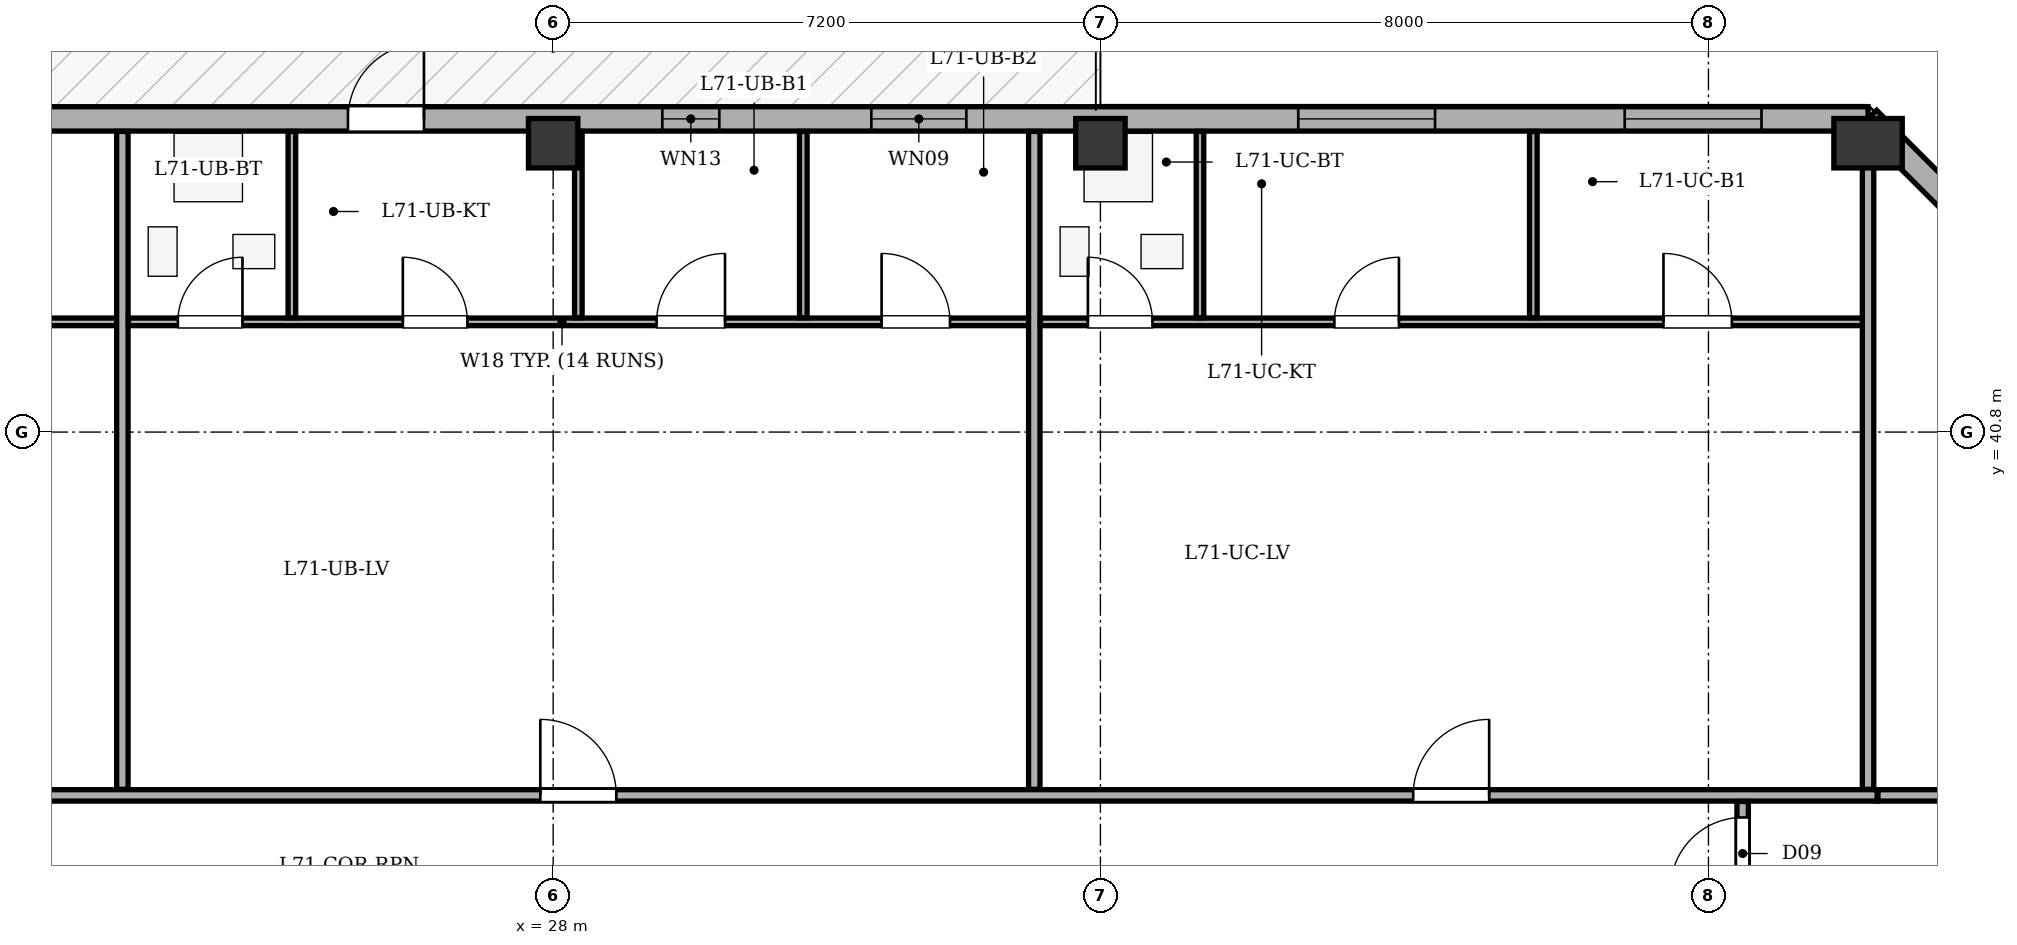
"""IFC4 building model, lengths in metres.
Left out: names, types, materials, properties, quantities, classifications, styles, units other than length and angle.
Written with IfcOpenShell. Run it as: python <this file> out.ifc"""

import sys

from ifc_helpers import new_model, si_unit, direction, frame, frame_2d, origin, origin_2d, place, context, subcontext, project, spatial, rectangle, extrude, element, fill, save


model = new_model("IFC4")
c1 = context("Model", 3, precision=1e-05, world=origin(), true_north=direction((0.0, 1.0)))
c2 = subcontext(c1, "Body", "Model", "MODEL_VIEW")
j1 = project(units=[si_unit("LENGTHUNIT", "METRE"), si_unit("PLANEANGLEUNIT", "RADIAN")], contexts=[c1])
p1 = place(None, origin())
s1 = spatial("IfcSite", under=j1, at=p1, CompositionType="ELEMENT")
p2 = place(p1, origin())
s2 = spatial("IfcBuilding", under=s1, at=p2, CompositionType="ELEMENT")
p3 = place(p2, frame((0.0, 0.0, 268.7)))
s3 = spatial("IfcBuildingStorey", under=s2, at=p3, CompositionType="ELEMENT", Elevation=268.7)
for number, where, z_axis, x_axis in (
    (1, (28.0, 44.6, 0.0), (0.0, 0.0, 1.0), (1.0, 0.0, 0.0)),
    (2, (35.2, 44.6, 0.0), (0.0, 0.0, 1.0), (1.0, 0.0, 0.0)),
):
    element("IfcColumn", number, at=place(p3, frame(where, z_axis=z_axis, x_axis=x_axis)), inside=s3, PredefinedType="COLUMN", context=c2, shape_type="SweptSolid", body=[
        extrude(rectangle(XDim=0.65, YDim=0.65, at=origin_2d()), origin(), (0.0, 0.0, 1.0), 3.4),
    ])
p4 = place(p3, frame((45.3, 44.6, 0.0), z_axis=(0.0, 0.0, 1.0), x_axis=(1.0, 0.0, 0.0)))
e3 = element("IfcColumn", 3, at=p4, inside=s3, PredefinedType="COLUMN", context=c2, shape_type="SweptSolid", body=[
    extrude(rectangle(XDim=0.65, YDim=0.9, at=origin_2d()), origin(), (0.0, 0.0, 1.0), 3.4),
])
p5 = place(p3, frame((8.3, 44.92, 0.0), z_axis=(0.0, 0.0, 1.0), x_axis=(1.0, 0.0, 0.0)))
e4 = element("IfcWall", 4, at=p5, inside=s3, PredefinedType="STANDARD", context=c2, shape_type="SweptSolid", body=[
    extrude(rectangle(XDim=37.0, YDim=0.32, at=frame_2d((18.5, 0.0))), origin(), (0.0, 0.0, 1.0), 2.725),
])
p6 = place(p5, frame((17.0, 0.0, 0.0)))
e5 = element("IfcOpeningElement", 5, at=p6, cuts=e4, PredefinedType="OPENING", context=c2, shape_type="SweptSolid", body=[
    extrude(rectangle(XDim=1.0, YDim=2.02, at=frame_2d((0.5, 1.01))), frame((0.0, 0.17, 0.0), z_axis=(0.0, -1.0, 0.0), x_axis=(1.0, 0.0, 0.0)), (0.0, 0.0, 1.0), 0.34),
])
p7 = place(p5, frame((6.295, 0.0, 0.75)))
e6 = element("IfcOpeningElement", 6, at=p7, cuts=e4, PredefinedType="OPENING", context=c2, shape_type="SweptSolid", body=[
    extrude(rectangle(XDim=1.8, YDim=1.7, at=frame_2d((0.9, 0.85))), frame((0.0, 0.17, 0.0), z_axis=(0.0, -1.0, 0.0), x_axis=(1.0, 0.0, 0.0)), (0.0, 0.0, 1.0), 0.34),
])
p8 = place(p5, frame((23.886, 0.0, 0.75)))
e7 = element("IfcOpeningElement", 7, at=p8, cuts=e4, PredefinedType="OPENING", context=c2, shape_type="SweptSolid", body=[
    extrude(rectangle(XDim=1.25, YDim=1.7, at=frame_2d((0.625, 0.85))), frame((0.0, 0.17, 0.0), z_axis=(0.0, -1.0, 0.0), x_axis=(1.0, 0.0, 0.0)), (0.0, 0.0, 1.0), 0.34),
])
p9 = place(p5, frame((29.503, 0.0, 0.75)))
e8 = element("IfcOpeningElement", 8, at=p9, cuts=e4, PredefinedType="OPENING", context=c2, shape_type="SweptSolid", body=[
    extrude(rectangle(XDim=1.8, YDim=1.7, at=frame_2d((0.9, 0.85))), frame((0.0, 0.17, 0.0), z_axis=(0.0, -1.0, 0.0), x_axis=(1.0, 0.0, 0.0)), (0.0, 0.0, 1.0), 0.34),
])
p10 = place(p5, frame((33.798, 0.0, 0.75)))
e9 = element("IfcOpeningElement", 9, at=p10, cuts=e4, PredefinedType="OPENING", context=c2, shape_type="SweptSolid", body=[
    extrude(rectangle(XDim=1.8, YDim=1.7, at=frame_2d((0.9, 0.85))), frame((0.0, 0.17, 0.0), z_axis=(0.0, -1.0, 0.0), x_axis=(1.0, 0.0, 0.0)), (0.0, 0.0, 1.0), 0.34),
])
p11 = place(p5, frame((10.558, 0.0, 0.75)))
e10 = element("IfcOpeningElement", 10, at=p11, cuts=e4, PredefinedType="OPENING", context=c2, shape_type="SweptSolid", body=[
    extrude(rectangle(XDim=0.75, YDim=1.45, at=frame_2d((0.375, 0.725))), frame((0.0, 0.17, 0.0), z_axis=(0.0, -1.0, 0.0), x_axis=(1.0, 0.0, 0.0)), (0.0, 0.0, 1.0), 0.34),
])
p12 = place(p5, frame((21.136, 0.0, 0.75)))
e11 = element("IfcOpeningElement", 11, at=p12, cuts=e4, PredefinedType="OPENING", context=c2, shape_type="SweptSolid", body=[
    extrude(rectangle(XDim=0.75, YDim=1.45, at=frame_2d((0.375, 0.725))), frame((0.0, 0.17, 0.0), z_axis=(0.0, -1.0, 0.0), x_axis=(1.0, 0.0, 0.0)), (0.0, 0.0, 1.0), 0.34),
])
p13 = place(p3, frame((45.3, 44.92, 0.0), z_axis=(0.0, 0.0, 1.0), x_axis=(0.70712937715, -0.707084184501, 0.0)))
e12 = element("IfcWall", 12, at=p13, inside=s3, PredefinedType="STANDARD", context=c2, shape_type="SweptSolid", body=[
    extrude(rectangle(XDim=5.402, YDim=0.32, at=frame_2d((2.701, 0.0))), origin(), (0.0, 0.0, 1.0), 2.725),
])
p14 = place(p13, frame((2.001, 0.0, 0.75)))
e13 = element("IfcOpeningElement", 13, at=p14, cuts=e12, PredefinedType="OPENING", context=c2, shape_type="SweptSolid", body=[
    extrude(rectangle(XDim=1.4, YDim=1.65, at=frame_2d((0.7, 0.825))), frame((0.0, 0.17, 0.0), z_axis=(0.0, -1.0, 0.0), x_axis=(1.0, 0.0, 0.0)), (0.0, 0.0, 1.0), 0.34),
])
p15 = place(p3, frame((10.9, 36.02, 0.0), z_axis=(0.0, 0.0, 1.0), x_axis=(1.0, 0.0, 0.0)))
e14 = element("IfcWall", 14, at=p15, inside=s3, PredefinedType="PARTITIONING", context=c2, shape_type="SweptSolid", body=[
    extrude(rectangle(XDim=34.52, YDim=0.15, at=frame_2d((17.26, 0.0))), origin(), (0.0, 0.0, 1.0), 3.1),
])
p16 = place(p15, frame((5.276, 0.0, 0.0)))
e15 = element("IfcOpeningElement", 15, at=p16, cuts=e14, PredefinedType="OPENING", context=c2, shape_type="SweptSolid", body=[
    extrude(rectangle(XDim=1.0, YDim=2.1, at=frame_2d((0.5, 1.05))), frame((0.0, 0.085, 0.0), z_axis=(0.0, -1.0, 0.0), x_axis=(1.0, 0.0, 0.0)), (0.0, 0.0, 1.0), 0.17),
])
p17 = place(p15, frame((16.931, 0.0, 0.0)))
e16 = element("IfcOpeningElement", 16, at=p17, cuts=e14, PredefinedType="OPENING", context=c2, shape_type="SweptSolid", body=[
    extrude(rectangle(XDim=1.0, YDim=2.1, at=frame_2d((0.5, 1.05))), frame((0.0, 0.085, 0.0), z_axis=(0.0, -1.0, 0.0), x_axis=(1.0, 0.0, 0.0)), (0.0, 0.0, 1.0), 0.17),
])
p18 = place(p15, frame((28.415, 0.0, 0.0)))
e17 = element("IfcOpeningElement", 17, at=p18, cuts=e14, PredefinedType="OPENING", context=c2, shape_type="SweptSolid", body=[
    extrude(rectangle(XDim=1.0, YDim=2.1, at=frame_2d((0.5, 1.05))), frame((0.0, 0.085, 0.0), z_axis=(0.0, -1.0, 0.0), x_axis=(1.0, 0.0, 0.0)), (0.0, 0.0, 1.0), 0.17),
])
p19 = place(p3, frame((11.1, 42.25, 0.0), z_axis=(0.0, 0.0, 1.0), x_axis=(1.0, 0.0, 0.0)))
e18 = element("IfcWall", 18, at=p19, inside=s3, PredefinedType="PARTITIONING", context=c2, shape_type="SweptSolid", body=[
    extrude(rectangle(XDim=11.272, YDim=0.1, at=frame_2d((5.636, 0.0))), origin(), (0.0, 0.0, 1.0), 3.1),
])
p20 = place(p19, frame((0.625, 0.0, 0.0)))
e19 = element("IfcOpeningElement", 19, at=p20, cuts=e18, PredefinedType="OPENING", context=c2, shape_type="SweptSolid", body=[
    extrude(rectangle(XDim=0.85, YDim=2.05, at=frame_2d((0.425, 1.025))), frame((0.0, 0.06, 0.0), z_axis=(0.0, -1.0, 0.0), x_axis=(1.0, 0.0, 0.0)), (0.0, 0.0, 1.0), 0.12),
])
p21 = place(p19, frame((3.971, 0.0, 0.0)))
e20 = element("IfcOpeningElement", 20, at=p21, cuts=e18, PredefinedType="OPENING", context=c2, shape_type="SweptSolid", body=[
    extrude(rectangle(XDim=0.85, YDim=2.05, at=frame_2d((0.425, 1.025))), frame((0.0, 0.06, 0.0), z_axis=(0.0, -1.0, 0.0), x_axis=(1.0, 0.0, 0.0)), (0.0, 0.0, 1.0), 0.12),
])
p22 = place(p19, frame((8.472, 0.0, 0.0)))
e21 = element("IfcOpeningElement", 21, at=p22, cuts=e18, PredefinedType="OPENING", context=c2, shape_type="SweptSolid", body=[
    extrude(rectangle(XDim=0.9, YDim=2.05, at=frame_2d((0.45, 1.025))), frame((0.0, 0.06, 0.0), z_axis=(0.0, -1.0, 0.0), x_axis=(1.0, 0.0, 0.0)), (0.0, 0.0, 1.0), 0.12),
])
p23 = place(p3, frame((22.332, 36.1, 0.0), z_axis=(0.0, 0.0, 1.0), x_axis=(0.0, 1.0, 0.0)))
e22 = element("IfcWall", 22, at=p23, inside=s3, PredefinedType="PARTITIONING", context=c2, shape_type="SweptSolid", body=[
    extrude(rectangle(XDim=8.655, YDim=0.15, at=frame_2d((4.327, 0.0))), origin(), (0.0, 0.0, 1.0), 2.725),
])
p24 = place(p3, frame((22.412, 42.25, 0.0), z_axis=(0.0, 0.0, 1.0), x_axis=(1.0, 0.0, 0.0)))
e23 = element("IfcWall", 23, at=p24, inside=s3, PredefinedType="PARTITIONING", context=c2, shape_type="SweptSolid", body=[
    extrude(rectangle(XDim=11.958, YDim=0.1, at=frame_2d((5.979, 0.0))), origin(), (0.0, 0.0, 1.0), 3.1),
])
p25 = place(p24, frame((0.65, 0.0, 0.0)))
e24 = element("IfcOpeningElement", 24, at=p25, cuts=e23, PredefinedType="OPENING", context=c2, shape_type="SweptSolid", body=[
    extrude(rectangle(XDim=0.85, YDim=2.05, at=frame_2d((0.425, 1.025))), frame((0.0, 0.06, 0.0), z_axis=(0.0, -1.0, 0.0), x_axis=(1.0, 0.0, 0.0)), (0.0, 0.0, 1.0), 0.12),
])
p26 = place(p24, frame((3.61, 0.0, 0.0)))
e25 = element("IfcOpeningElement", 25, at=p26, cuts=e23, PredefinedType="OPENING", context=c2, shape_type="SweptSolid", body=[
    extrude(rectangle(XDim=0.85, YDim=2.05, at=frame_2d((0.425, 1.025))), frame((0.0, 0.06, 0.0), z_axis=(0.0, -1.0, 0.0), x_axis=(1.0, 0.0, 0.0)), (0.0, 0.0, 1.0), 0.12),
])
p27 = place(p24, frame((6.949, 0.0, 0.0)))
e26 = element("IfcOpeningElement", 26, at=p27, cuts=e23, PredefinedType="OPENING", context=c2, shape_type="SweptSolid", body=[
    extrude(rectangle(XDim=0.9, YDim=2.05, at=frame_2d((0.45, 1.025))), frame((0.0, 0.06, 0.0), z_axis=(0.0, -1.0, 0.0), x_axis=(1.0, 0.0, 0.0)), (0.0, 0.0, 1.0), 0.12),
])
p28 = place(p24, frame((9.909, 0.0, 0.0)))
e27 = element("IfcOpeningElement", 27, at=p28, cuts=e23, PredefinedType="OPENING", context=c2, shape_type="SweptSolid", body=[
    extrude(rectangle(XDim=0.9, YDim=2.05, at=frame_2d((0.45, 1.025))), frame((0.0, 0.06, 0.0), z_axis=(0.0, -1.0, 0.0), x_axis=(1.0, 0.0, 0.0)), (0.0, 0.0, 1.0), 0.12),
])
for number, where, z_axis, x_axis in (
    (28, (24.562, 42.305, 0.0), (0.0, 0.0, 1.0), (0.0, 1.0, 0.0)),
    (29, (28.331, 42.305, 0.0), (0.0, 0.0, 1.0), (0.0, 1.0, 0.0)),
    (30, (31.291, 42.305, 0.0), (0.0, 0.0, 1.0), (0.0, 1.0, 0.0)),
):
    element("IfcWall", number, at=place(p3, frame(where, z_axis=z_axis, x_axis=x_axis)), inside=s3, PredefinedType="PARTITIONING", context=c2, shape_type="SweptSolid", body=[
        extrude(rectangle(XDim=2.45, YDim=0.1, at=frame_2d((1.225, 0.0))), origin(), (0.0, 0.0, 1.0), 3.1),
    ])
p29 = place(p3, frame((34.33, 36.1, 0.0), z_axis=(0.0, 0.0, 1.0), x_axis=(0.0, 1.0, 0.0)))
e31 = element("IfcWall", 31, at=p29, inside=s3, PredefinedType="PARTITIONING", context=c2, shape_type="SweptSolid", body=[
    extrude(rectangle(XDim=8.655, YDim=0.15, at=frame_2d((4.327, 0.0))), origin(), (0.0, 0.0, 1.0), 3.1),
])
p30 = place(p3, frame((34.41, 42.25, 0.0), z_axis=(0.0, 0.0, 1.0), x_axis=(1.0, 0.0, 0.0)))
e32 = element("IfcWall", 32, at=p30, inside=s3, PredefinedType="PARTITIONING", context=c2, shape_type="SweptSolid", body=[
    extrude(rectangle(XDim=10.93, YDim=0.1, at=frame_2d((5.465, 0.0))), origin(), (0.0, 0.0, 1.0), 3.1),
])
p31 = place(p30, frame((0.625, 0.0, 0.0)))
e33 = element("IfcOpeningElement", 33, at=p31, cuts=e32, PredefinedType="OPENING", context=c2, shape_type="SweptSolid", body=[
    extrude(rectangle(XDim=0.85, YDim=2.05, at=frame_2d((0.425, 1.025))), frame((0.0, 0.06, 0.0), z_axis=(0.0, -1.0, 0.0), x_axis=(1.0, 0.0, 0.0)), (0.0, 0.0, 1.0), 0.12),
])
p32 = place(p30, frame((3.868, 0.0, 0.0)))
e34 = element("IfcOpeningElement", 34, at=p32, cuts=e32, PredefinedType="OPENING", context=c2, shape_type="SweptSolid", body=[
    extrude(rectangle(XDim=0.85, YDim=2.05, at=frame_2d((0.425, 1.025))), frame((0.0, 0.06, 0.0), z_axis=(0.0, -1.0, 0.0), x_axis=(1.0, 0.0, 0.0)), (0.0, 0.0, 1.0), 0.12),
])
p33 = place(p30, frame((8.198, 0.0, 0.0)))
e35 = element("IfcOpeningElement", 35, at=p33, cuts=e32, PredefinedType="OPENING", context=c2, shape_type="SweptSolid", body=[
    extrude(rectangle(XDim=0.9, YDim=2.05, at=frame_2d((0.45, 1.025))), frame((0.0, 0.06, 0.0), z_axis=(0.0, -1.0, 0.0), x_axis=(1.0, 0.0, 0.0)), (0.0, 0.0, 1.0), 0.12),
])
p34 = place(p3, frame((36.51, 42.305, 0.0), z_axis=(0.0, 0.0, 1.0), x_axis=(0.0, 1.0, 0.0)))
e36 = element("IfcWall", 36, at=p34, inside=s3, PredefinedType="PARTITIONING", context=c2, shape_type="SweptSolid", body=[
    extrude(rectangle(XDim=2.45, YDim=0.1, at=frame_2d((1.225, 0.0))), origin(), (0.0, 0.0, 1.0), 2.725),
])
p35 = place(p3, frame((40.896, 42.305, 0.0), z_axis=(0.0, 0.0, 1.0), x_axis=(0.0, 1.0, 0.0)))
e37 = element("IfcWall", 37, at=p35, inside=s3, PredefinedType="PARTITIONING", context=c2, shape_type="SweptSolid", body=[
    extrude(rectangle(XDim=2.45, YDim=0.1, at=frame_2d((1.225, 0.0))), origin(), (0.0, 0.0, 1.0), 3.1),
])
p36 = place(p3, frame((45.3, 36.1, 0.0), z_axis=(0.0, 0.0, 1.0), x_axis=(0.0, 1.0, 0.0)))
e38 = element("IfcWall", 38, at=p36, inside=s3, PredefinedType="PARTITIONING", context=c2, shape_type="SweptSolid", body=[
    extrude(rectangle(XDim=8.655, YDim=0.15, at=frame_2d((4.327, 0.0))), origin(), (0.0, 0.0, 1.0), 3.1),
])
p37 = place(p3, frame((45.43, 36.02, 0.0), z_axis=(0.0, 0.0, 1.0), x_axis=(1.0, 0.0, 0.0)))
e39 = element("IfcWall", 39, at=p37, inside=s3, PredefinedType="PARTITIONING", context=c2, shape_type="SweptSolid", body=[
    extrude(rectangle(XDim=3.525, YDim=0.15, at=frame_2d((1.763, 0.0))), origin(), (0.0, 0.0, 1.0), 3.1),
])
p38 = place(p3, frame((43.65, 34.15, 0.0), z_axis=(0.0, 0.0, 1.0), x_axis=(0.0, 1.0, 0.0)))
e40 = element("IfcWall", 40, at=p38, inside=s3, PredefinedType="PARTITIONING", context=c2, shape_type="SweptSolid", body=[
    extrude(rectangle(XDim=1.79, YDim=0.15, at=frame_2d((0.895, 0.0))), origin(), (0.0, 0.0, 1.0), 3.1),
])
p39 = place(p38, frame((0.63, 0.0, 0.0)))
e41 = element("IfcOpeningElement", 41, at=p39, cuts=e40, PredefinedType="OPENING", context=c2, shape_type="SweptSolid", body=[
    extrude(rectangle(XDim=0.95, YDim=2.1, at=frame_2d((0.475, 1.05))), frame((0.0, 0.085, 0.0), z_axis=(0.0, -1.0, 0.0), x_axis=(1.0, 0.0, 0.0)), (0.0, 0.0, 1.0), 0.17),
])
p40 = place(p6, origin())
e42 = element("IfcDoor", 42, at=p40, inside=s3, OperationType="SINGLE_SWING_RIGHT", PredefinedType="DOOR", context=c2, shape_type="SweptSolid", body=[
    extrude(rectangle(XDim=1.0, YDim=2.02, at=frame_2d((0.5, 1.01))), frame((0.0, 0.025, 0.0), z_axis=(0.0, -1.0, 0.0), x_axis=(1.0, 0.0, 0.0)), (0.0, 0.0, 1.0), 0.05),
])
fill(e5, e42)
p41 = place(p8, origin())
e43 = element("IfcWindow", 43, at=p41, inside=s3, PartitioningType="SINGLE_PANEL", PredefinedType="WINDOW", context=c2, shape_type="SweptSolid", body=[
    extrude(rectangle(XDim=1.25, YDim=1.7, at=frame_2d((0.625, 0.85))), frame((0.0, -0.01, 0.0), z_axis=(0.0, -1.0, 0.0), x_axis=(1.0, 0.0, 0.0)), (0.0, 0.0, 1.0), 0.06),
])
fill(e7, e43)
p42 = place(p9, origin())
e44 = element("IfcWindow", 44, at=p42, inside=s3, PartitioningType="SINGLE_PANEL", PredefinedType="WINDOW", context=c2, shape_type="SweptSolid", body=[
    extrude(rectangle(XDim=1.8, YDim=1.7, at=frame_2d((0.9, 0.85))), frame((0.0, -0.01, 0.0), z_axis=(0.0, -1.0, 0.0), x_axis=(1.0, 0.0, 0.0)), (0.0, 0.0, 1.0), 0.06),
])
fill(e8, e44)
p43 = place(p10, origin())
e45 = element("IfcWindow", 45, at=p43, inside=s3, PartitioningType="SINGLE_PANEL", PredefinedType="WINDOW", context=c2, shape_type="SweptSolid", body=[
    extrude(rectangle(XDim=1.8, YDim=1.7, at=frame_2d((0.9, 0.85))), frame((0.0, -0.01, 0.0), z_axis=(0.0, -1.0, 0.0), x_axis=(1.0, 0.0, 0.0)), (0.0, 0.0, 1.0), 0.06),
])
fill(e9, e45)
p44 = place(p12, origin())
e46 = element("IfcWindow", 46, at=p44, inside=s3, PartitioningType="SINGLE_PANEL", PredefinedType="WINDOW", context=c2, shape_type="SweptSolid", body=[
    extrude(rectangle(XDim=0.75, YDim=1.45, at=frame_2d((0.375, 0.725))), frame((0.0, -0.01, 0.0), z_axis=(0.0, -1.0, 0.0), x_axis=(1.0, 0.0, 0.0)), (0.0, 0.0, 1.0), 0.06),
])
fill(e11, e46)
p45 = place(p17, origin())
e47 = element("IfcDoor", 47, at=p45, inside=s3, OperationType="SINGLE_SWING_LEFT", PredefinedType="DOOR", context=c2, shape_type="SweptSolid", body=[
    extrude(rectangle(XDim=1.0, YDim=2.1, at=frame_2d((0.5, 1.05))), frame((0.0, 0.025, 0.0), z_axis=(0.0, -1.0, 0.0), x_axis=(1.0, 0.0, 0.0)), (0.0, 0.0, 1.0), 0.05),
])
fill(e16, e47)
p46 = place(p18, origin())
e48 = element("IfcDoor", 48, at=p46, inside=s3, OperationType="SINGLE_SWING_RIGHT", PredefinedType="DOOR", context=c2, shape_type="SweptSolid", body=[
    extrude(rectangle(XDim=1.0, YDim=2.1, at=frame_2d((0.5, 1.05))), frame((0.0, 0.025, 0.0), z_axis=(0.0, -1.0, 0.0), x_axis=(1.0, 0.0, 0.0)), (0.0, 0.0, 1.0), 0.05),
])
fill(e17, e48)
p47 = place(p25, origin())
e49 = element("IfcDoor", 49, at=p47, inside=s3, OperationType="SINGLE_SWING_RIGHT", PredefinedType="DOOR", context=c2, shape_type="SweptSolid", body=[
    extrude(rectangle(XDim=0.85, YDim=2.05, at=frame_2d((0.425, 1.025))), frame((0.0, 0.025, 0.0), z_axis=(0.0, -1.0, 0.0), x_axis=(1.0, 0.0, 0.0)), (0.0, 0.0, 1.0), 0.05),
])
fill(e24, e49)
p48 = place(p26, origin())
e50 = element("IfcDoor", 50, at=p48, inside=s3, OperationType="SINGLE_SWING_LEFT", PredefinedType="DOOR", context=c2, shape_type="SweptSolid", body=[
    extrude(rectangle(XDim=0.85, YDim=2.05, at=frame_2d((0.425, 1.025))), frame((0.0, 0.025, 0.0), z_axis=(0.0, -1.0, 0.0), x_axis=(1.0, 0.0, 0.0)), (0.0, 0.0, 1.0), 0.05),
])
fill(e25, e50)
p49 = place(p27, origin())
e51 = element("IfcDoor", 51, at=p49, inside=s3, OperationType="SINGLE_SWING_RIGHT", PredefinedType="DOOR", context=c2, shape_type="SweptSolid", body=[
    extrude(rectangle(XDim=0.9, YDim=2.05, at=frame_2d((0.45, 1.025))), frame((0.0, 0.025, 0.0), z_axis=(0.0, -1.0, 0.0), x_axis=(1.0, 0.0, 0.0)), (0.0, 0.0, 1.0), 0.05),
])
fill(e26, e51)
p50 = place(p28, origin())
e52 = element("IfcDoor", 52, at=p50, inside=s3, OperationType="SINGLE_SWING_LEFT", PredefinedType="DOOR", context=c2, shape_type="SweptSolid", body=[
    extrude(rectangle(XDim=0.9, YDim=2.05, at=frame_2d((0.45, 1.025))), frame((0.0, 0.025, 0.0), z_axis=(0.0, -1.0, 0.0), x_axis=(1.0, 0.0, 0.0)), (0.0, 0.0, 1.0), 0.05),
])
fill(e27, e52)
p51 = place(p31, origin())
e53 = element("IfcDoor", 53, at=p51, inside=s3, OperationType="SINGLE_SWING_LEFT", PredefinedType="DOOR", context=c2, shape_type="SweptSolid", body=[
    extrude(rectangle(XDim=0.85, YDim=2.05, at=frame_2d((0.425, 1.025))), frame((0.0, 0.025, 0.0), z_axis=(0.0, -1.0, 0.0), x_axis=(1.0, 0.0, 0.0)), (0.0, 0.0, 1.0), 0.05),
])
fill(e33, e53)
p52 = place(p32, origin())
e54 = element("IfcDoor", 54, at=p52, inside=s3, OperationType="SINGLE_SWING_RIGHT", PredefinedType="DOOR", context=c2, shape_type="SweptSolid", body=[
    extrude(rectangle(XDim=0.85, YDim=2.05, at=frame_2d((0.425, 1.025))), frame((0.0, 0.025, 0.0), z_axis=(0.0, -1.0, 0.0), x_axis=(1.0, 0.0, 0.0)), (0.0, 0.0, 1.0), 0.05),
])
fill(e34, e54)
p53 = place(p33, origin())
e55 = element("IfcDoor", 55, at=p53, inside=s3, OperationType="SINGLE_SWING_LEFT", PredefinedType="DOOR", context=c2, shape_type="SweptSolid", body=[
    extrude(rectangle(XDim=0.9, YDim=2.05, at=frame_2d((0.45, 1.025))), frame((0.0, 0.025, 0.0), z_axis=(0.0, -1.0, 0.0), x_axis=(1.0, 0.0, 0.0)), (0.0, 0.0, 1.0), 0.05),
])
fill(e35, e55)
p54 = place(p39, origin())
e56 = element("IfcDoor", 56, at=p54, inside=s3, OperationType="SINGLE_SWING_LEFT", PredefinedType="DOOR", context=c2, shape_type="SweptSolid", body=[
    extrude(rectangle(XDim=0.95, YDim=2.1, at=frame_2d((0.475, 1.05))), frame((0.0, 0.025, 0.0), z_axis=(0.0, -1.0, 0.0), x_axis=(1.0, 0.0, 0.0)), (0.0, 0.0, 1.0), 0.05),
])
fill(e41, e56)
save(model, sys.argv[1])
